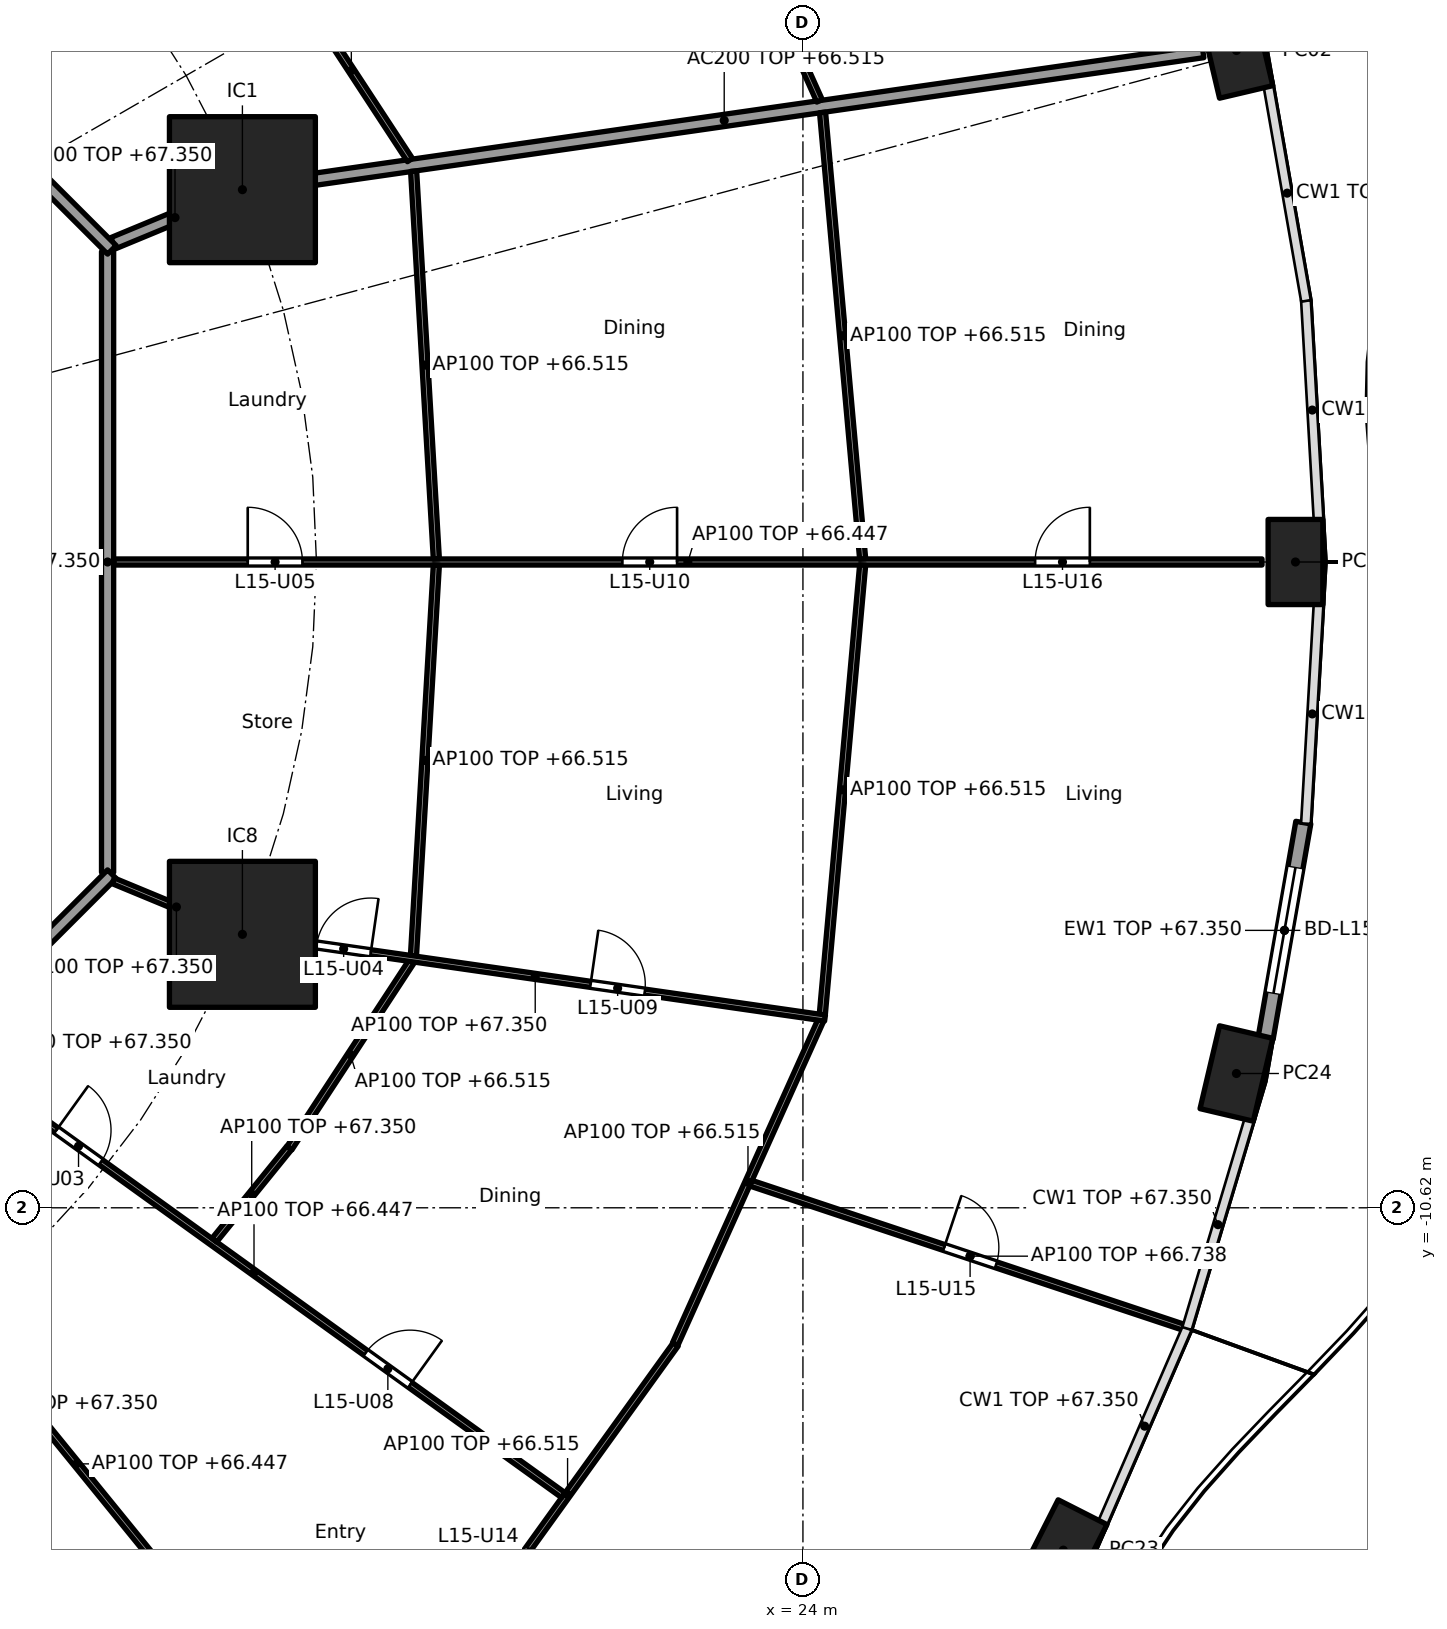
"""IFC4 building model, lengths in metres.
Left out: names, types, materials, properties, quantities, classifications, styles, units other than length and angle.
Written with IfcOpenShell. Run it as: python <this file> out.ifc"""

import sys

from ifc_helpers import new_model, si_unit, direction, frame, frame_2d, origin, origin_2d, place, context, subcontext, project, spatial, rectangle, hollow_rectangle, extrude, element, fill, save


model = new_model("IFC4")
c1 = context("Model", 3, precision=1e-05, world=origin(), true_north=direction((0.0, 1.0)))
c2 = subcontext(c1, "Body", "Model", "MODEL_VIEW")
j1 = project(units=[si_unit("LENGTHUNIT", "METRE"), si_unit("PLANEANGLEUNIT", "RADIAN")], contexts=[c1])
p1 = place(None, origin())
s1 = spatial("IfcSite", under=j1, at=p1, CompositionType="ELEMENT")
p2 = place(p1, origin())
s2 = spatial("IfcBuilding", under=s1, at=p2, CompositionType="ELEMENT")
p3 = place(p2, frame((0.0, 0.0, 64.0)))
s3 = spatial("IfcBuildingStorey", under=s2, at=p3, CompositionType="ELEMENT", Elevation=64.0)
for number, where, z_axis, x_axis in (
    (1, (32.1, 0.0, 0.0), (0.0, 0.0, 1.0), (0.0, 1.0, 0.0)),
    (2, (31.129, 8.412, 0.0), (0.0, 0.0, 1.0), (-0.229, 0.973, 0.0)),
    (3, (28.282, -16.25, 0.0), (0.0, 0.0, 1.0), (0.452, 0.892, 0.0)),
    (4, (31.129, -8.412, 0.0), (0.0, 0.0, 1.0), (0.229, 0.973, 0.0)),
):
    element("IfcColumn", number, at=place(p3, frame(where, z_axis=z_axis, x_axis=x_axis)), inside=s3, PredefinedType="COLUMN", context=c2, shape_type="SweptSolid", body=[
        extrude(hollow_rectangle(XDim=1.4, YDim=0.9, WallThickness=0.05, at=origin_2d()), origin(), (0.0, 0.0, 1.0), 3.7),
    ])
for number, where, z_axis, x_axis in (
    (5, (14.782, 6.123, 0.0), (0.0, 0.0, 1.0), (1.0, 0.0, 0.0)),
    (6, (14.782, -6.123, 0.0), (0.0, 0.0, 1.0), (1.0, 0.0, 0.0)),
):
    element("IfcColumn", number, at=place(p3, frame(where, z_axis=z_axis, x_axis=x_axis)), inside=s3, PredefinedType="COLUMN", context=c2, shape_type="SweptSolid", body=[
        extrude(rectangle(XDim=2.4, YDim=2.4, at=origin_2d()), origin(), (0.0, 0.0, 1.0), 3.7),
    ])
p4 = place(p3, frame((32.229, -4.286, 0.0), z_axis=(0.0, 0.0, 1.0), x_axis=(-0.172217377323, -0.98505897029, 0.0)))
e7 = element("IfcWall", 7, at=p4, inside=s3, PredefinedType="SOLIDWALL", context=c2, shape_type="SweptSolid", body=[
    extrude(rectangle(XDim=3.598, YDim=0.25, at=frame_2d((1.799, 0.0))), origin(), (0.0, 0.0, 1.0), 3.35),
])
p5 = place(p4, frame((0.749, 0.0, 0.0)))
e8 = element("IfcOpeningElement", 8, at=p5, cuts=e7, PredefinedType="OPENING", context=c2, shape_type="SweptSolid", body=[
    extrude(rectangle(XDim=2.1, YDim=2.4, at=frame_2d((1.05, 1.2))), frame((0.0, 0.135, 0.0), z_axis=(0.0, -1.0, 0.0), x_axis=(1.0, 0.0, 0.0)), (0.0, 0.0, 1.0), 0.27),
])
p6 = place(p3, frame((12.657, 5.243, 0.0), z_axis=(0.0, 0.0, 1.0), x_axis=(0.923853160736, 0.382747093259, 0.0)))
e9 = element("IfcWall", 9, at=p6, inside=s3, PredefinedType="PARTITIONING", context=c2, shape_type="SweptSolid", body=[
    extrude(rectangle(XDim=2.2, YDim=0.2, at=frame_2d((1.1, 0.0))), origin(), (0.0, 0.0, 1.0), 3.35),
])
p7 = place(p3, frame((14.832, 6.13, 0.0), z_axis=(0.0, 0.0, 1.0), x_axis=(0.989836541293, 0.142209779978, 0.0)))
e10 = element("IfcWall", 10, at=p7, inside=s3, PredefinedType="PARTITIONING", context=c2, shape_type="SweptSolid", body=[
    extrude(rectangle(XDim=15.909, YDim=0.2, at=frame_2d((7.955, 0.0))), origin(), (0.0, 0.0, 1.0), 2.515),
])
p8 = place(p3, frame((12.565, -5.104, 0.0), z_axis=(0.0, 0.0, 1.0), x_axis=(0.0, 1.0, 0.0)))
e11 = element("IfcWall", 11, at=p8, inside=s3, PredefinedType="PARTITIONING", context=c2, shape_type="SweptSolid", body=[
    extrude(rectangle(XDim=10.209, YDim=0.2, at=frame_2d((5.104, 0.0))), origin(), (0.0, 0.0, 1.0), 3.35),
])
p9 = place(p3, frame((12.635, 5.134, 0.0), z_axis=(0.0, 0.0, 1.0), x_axis=(-0.707106781187, 0.707106781187, 0.0)))
e12 = element("IfcWall", 12, at=p9, inside=s3, PredefinedType="PARTITIONING", context=c2, shape_type="SweptSolid", body=[
    extrude(rectangle(XDim=10.609, YDim=0.2, at=frame_2d((5.305, 0.0))), origin(), (0.0, 0.0, 1.0), 3.35),
])
p10 = place(p3, frame((5.275, -12.494, 0.0), z_axis=(0.0, 0.0, 1.0), x_axis=(0.707106781187, 0.707106781187, 0.0)))
e13 = element("IfcWall", 13, at=p10, inside=s3, PredefinedType="PARTITIONING", context=c2, shape_type="SweptSolid", body=[
    extrude(rectangle(XDim=10.409, YDim=0.2, at=frame_2d((5.205, 0.0))), origin(), (0.0, 0.0, 1.0), 3.35),
])
p11 = place(p10, frame((4.604, 0.0, 0.0)))
e14 = element("IfcOpeningElement", 14, at=p11, cuts=e13, PredefinedType="OPENING", context=c2, shape_type="SweptSolid", body=[
    extrude(rectangle(XDim=1.0, YDim=2.1, at=frame_2d((0.5, 1.05))), frame((0.0, 0.11, 0.0), z_axis=(0.0, -1.0, 0.0), x_axis=(1.0, 0.0, 0.0)), (0.0, 0.0, 1.0), 0.22),
])
p12 = place(p3, frame((12.665, 0.0, 0.0), z_axis=(0.0, 0.0, 1.0), x_axis=(1.0, 0.0, 0.0)))
e15 = element("IfcWall", 15, at=p12, inside=s3, PredefinedType="PARTITIONING", context=c2, shape_type="SweptSolid", body=[
    extrude(rectangle(XDim=18.885, YDim=0.1, at=frame_2d((9.443, 0.0))), origin(), (0.0, 0.0, 1.0), 2.447),
])
p13 = place(p12, frame((2.205, 0.0, 0.0)))
e16 = element("IfcOpeningElement", 16, at=p13, cuts=e15, PredefinedType="OPENING", context=c2, shape_type="SweptSolid", body=[
    extrude(rectangle(XDim=0.9, YDim=2.1, at=frame_2d((0.45, 1.05))), frame((0.0, 0.06, 0.0), z_axis=(0.0, -1.0, 0.0), x_axis=(1.0, 0.0, 0.0)), (0.0, 0.0, 1.0), 0.12),
])
p14 = place(p12, frame((8.366, 0.0, 0.0)))
e17 = element("IfcOpeningElement", 17, at=p14, cuts=e15, PredefinedType="OPENING", context=c2, shape_type="SweptSolid", body=[
    extrude(rectangle(XDim=0.9, YDim=2.1, at=frame_2d((0.45, 1.05))), frame((0.0, 0.06, 0.0), z_axis=(0.0, -1.0, 0.0), x_axis=(1.0, 0.0, 0.0)), (0.0, 0.0, 1.0), 0.12),
])
p15 = place(p12, frame((15.154, 0.0, 0.0)))
e18 = element("IfcOpeningElement", 18, at=p15, cuts=e15, PredefinedType="OPENING", context=c2, shape_type="SweptSolid", body=[
    extrude(rectangle(XDim=0.9, YDim=2.1, at=frame_2d((0.45, 1.05))), frame((0.0, 0.06, 0.0), z_axis=(0.0, -1.0, 0.0), x_axis=(1.0, 0.0, 0.0)), (0.0, 0.0, 1.0), 0.12),
])
p16 = place(p3, frame((17.971, 0.05, 0.0), z_axis=(0.0, 0.0, 1.0), x_axis=(-0.058513659907, 0.998286607946, 0.0)))
e19 = element("IfcWall", 19, at=p16, inside=s3, PredefinedType="PARTITIONING", context=c2, shape_type="SweptSolid", body=[
    extrude(rectangle(XDim=6.388, YDim=0.1, at=frame_2d((3.194, 0.0))), origin(), (0.0, 0.0, 1.0), 2.515),
])
p17 = place(p3, frame((17.971, -0.05, 0.0), z_axis=(0.0, 0.0, 1.0), x_axis=(-0.058475267553, -0.998288857538, 0.0)))
e20 = element("IfcWall", 20, at=p17, inside=s3, PredefinedType="PARTITIONING", context=c2, shape_type="SweptSolid", body=[
    extrude(rectangle(XDim=6.438, YDim=0.1, at=frame_2d((3.219, 0.0))), origin(), (0.0, 0.0, 1.0), 2.515),
])
p18 = place(p3, frame((24.982, 0.05, 0.0), z_axis=(0.0, 0.0, 1.0), x_axis=(-0.08944290521, 0.995991951126, 0.0)))
e21 = element("IfcWall", 21, at=p18, inside=s3, PredefinedType="PARTITIONING", context=c2, shape_type="SweptSolid", body=[
    extrude(rectangle(XDim=7.373, YDim=0.1, at=frame_2d((3.686, 0.0))), origin(), (0.0, 0.0, 1.0), 2.515),
])
p19 = place(p3, frame((24.982, -0.05, 0.0), z_axis=(0.0, 0.0, 1.0), x_axis=(-0.089432471274, -0.995992888068, 0.0)))
e22 = element("IfcWall", 22, at=p19, inside=s3, PredefinedType="PARTITIONING", context=c2, shape_type="SweptSolid", body=[
    extrude(rectangle(XDim=7.423, YDim=0.1, at=frame_2d((3.711, 0.0))), origin(), (0.0, 0.0, 1.0), 2.515),
])
p20 = place(p3, frame((17.537, 6.61, 0.0), z_axis=(0.0, 0.0, 1.0), x_axis=(-0.547637987196, 0.836715384692, 0.0)))
e23 = element("IfcWall", 23, at=p20, inside=s3, PredefinedType="PARTITIONING", context=c2, shape_type="SweptSolid", body=[
    extrude(rectangle(XDim=3.52, YDim=0.1, at=frame_2d((1.76, 0.0))), origin(), (0.0, 0.0, 1.0), 2.515),
])
p21 = place(p3, frame((24.273, 7.584, 0.0), z_axis=(0.0, 0.0, 1.0), x_axis=(-0.410201529109, 0.911994904326, 0.0)))
e24 = element("IfcWall", 24, at=p21, inside=s3, PredefinedType="PARTITIONING", context=c2, shape_type="SweptSolid", body=[
    extrude(rectangle(XDim=5.787, YDim=0.1, at=frame_2d((2.894, 0.0))), origin(), (0.0, 0.0, 1.0), 2.515),
])
p22 = place(p21, frame((2.444, 0.0, 0.0)))
e25 = element("IfcOpeningElement", 25, at=p22, cuts=e24, PredefinedType="OPENING", context=c2, shape_type="SweptSolid", body=[
    extrude(rectangle(XDim=0.9, YDim=2.1, at=frame_2d((0.45, 1.05))), frame((0.0, 0.06, 0.0), z_axis=(0.0, -1.0, 0.0), x_axis=(1.0, 0.0, 0.0)), (0.0, 0.0, 1.0), 0.12),
])
p23 = place(p3, frame((10.003, -15.503, 0.0), z_axis=(0.0, 0.0, 1.0), x_axis=(0.526446106164, -0.850208502254, 0.0)))
e26 = element("IfcWall", 26, at=p23, inside=s3, PredefinedType="PARTITIONING", context=c2, shape_type="SweptSolid", body=[
    extrude(rectangle(XDim=14.33, YDim=0.1, at=frame_2d((7.165, 0.0))), origin(), (0.0, 0.0, 1.0), 2.515),
])
p24 = place(p23, frame((10.415, 0.0, 0.0)))
e27 = element("IfcOpeningElement", 27, at=p24, cuts=e26, PredefinedType="OPENING", context=c2, shape_type="SweptSolid", body=[
    extrude(rectangle(XDim=0.9, YDim=2.1, at=frame_2d((0.45, 1.05))), frame((0.0, 0.06, 0.0), z_axis=(0.0, -1.0, 0.0), x_axis=(1.0, 0.0, 0.0)), (0.0, 0.0, 1.0), 0.12),
])
p25 = place(p3, frame((8.028, -9.882, 0.0), z_axis=(0.0, 0.0, 1.0), x_axis=(0.631035554955, -0.77575390968, 0.0)))
e28 = element("IfcWall", 28, at=p25, inside=s3, PredefinedType="PARTITIONING", context=c2, shape_type="SweptSolid", body=[
    extrude(rectangle(XDim=12.759, YDim=0.1, at=frame_2d((6.379, 0.0))), origin(), (0.0, 0.0, 1.0), 2.447),
])
p26 = place(p25, frame((2.311, 0.0, 0.0)))
e29 = element("IfcOpeningElement", 29, at=p26, cuts=e28, PredefinedType="OPENING", context=c2, shape_type="SweptSolid", body=[
    extrude(rectangle(XDim=0.9, YDim=2.1, at=frame_2d((0.45, 1.05))), frame((0.0, 0.06, 0.0), z_axis=(0.0, -1.0, 0.0), x_axis=(1.0, 0.0, 0.0)), (0.0, 0.0, 1.0), 0.12),
])
p27 = place(p25, frame((8.69, 0.0, 0.0)))
e30 = element("IfcOpeningElement", 30, at=p27, cuts=e28, PredefinedType="OPENING", context=c2, shape_type="SweptSolid", body=[
    extrude(rectangle(XDim=0.9, YDim=2.1, at=frame_2d((0.45, 1.05))), frame((0.0, 0.06, 0.0), z_axis=(0.0, -1.0, 0.0), x_axis=(1.0, 0.0, 0.0)), (0.0, 0.0, 1.0), 0.12),
])
p28 = place(p3, frame((18.351, -17.803, 0.0), z_axis=(0.0, 0.0, 1.0), x_axis=(0.584558392935, 0.811351640936, 0.0)))
e31 = element("IfcWall", 31, at=p28, inside=s3, PredefinedType="PARTITIONING", context=c2, shape_type="SweptSolid", body=[
    extrude(rectangle(XDim=6.084, YDim=0.1, at=frame_2d((3.042, 0.0))), origin(), (0.0, 0.0, 1.0), 2.515),
])
p29 = place(p28, frame((1.046, 0.0, 0.0)))
e32 = element("IfcOpeningElement", 32, at=p29, cuts=e31, PredefinedType="OPENING", context=c2, shape_type="SweptSolid", body=[
    extrude(rectangle(XDim=0.9, YDim=2.1, at=frame_2d((0.45, 1.05))), frame((0.0, 0.06, 0.0), z_axis=(0.0, -1.0, 0.0), x_axis=(1.0, 0.0, 0.0)), (0.0, 0.0, 1.0), 0.12),
])
p30 = place(p3, frame((9.886, -8.023, 0.0), z_axis=(0.0, 0.0, 1.0), x_axis=(0.811615973871, -0.58419133078, 0.0)))
e33 = element("IfcWall", 33, at=p30, inside=s3, PredefinedType="PARTITIONING", context=c2, shape_type="SweptSolid", body=[
    extrude(rectangle(XDim=12.535, YDim=0.1, at=frame_2d((6.268, 0.0))), origin(), (0.0, 0.0, 1.0), 2.447),
])
p31 = place(p30, frame((2.262, 0.0, 0.0)))
e34 = element("IfcOpeningElement", 34, at=p31, cuts=e33, PredefinedType="OPENING", context=c2, shape_type="SweptSolid", body=[
    extrude(rectangle(XDim=0.9, YDim=2.1, at=frame_2d((0.45, 1.05))), frame((0.0, 0.06, 0.0), z_axis=(0.0, -1.0, 0.0), x_axis=(1.0, 0.0, 0.0)), (0.0, 0.0, 1.0), 0.12),
])
p32 = place(p30, frame((8.53, 0.0, 0.0)))
e35 = element("IfcOpeningElement", 35, at=p32, cuts=e33, PredefinedType="OPENING", context=c2, shape_type="SweptSolid", body=[
    extrude(rectangle(XDim=0.9, YDim=2.1, at=frame_2d((0.45, 1.05))), frame((0.0, 0.06, 0.0), z_axis=(0.0, -1.0, 0.0), x_axis=(1.0, 0.0, 0.0)), (0.0, 0.0, 1.0), 0.12),
])
p33 = place(p3, frame((14.32, -11.153, 0.0), z_axis=(0.0, 0.0, 1.0), x_axis=(0.63006076661, 0.776545832761, 0.0)))
e36 = element("IfcWall", 36, at=p33, inside=s3, PredefinedType="PARTITIONING", context=c2, shape_type="SweptSolid", body=[
    extrude(rectangle(XDim=1.953, YDim=0.1, at=frame_2d((0.977, 0.0))), origin(), (0.0, 0.0, 1.0), 3.35),
])
p34 = place(p3, frame((15.555, -9.639, 0.0), z_axis=(0.0, 0.0, 1.0), x_axis=(0.547618530423, 0.836728119007, 0.0)))
e37 = element("IfcWall", 37, at=p34, inside=s3, PredefinedType="PARTITIONING", context=c2, shape_type="SweptSolid", body=[
    extrude(rectangle(XDim=3.67, YDim=0.1, at=frame_2d((1.835, 0.0))), origin(), (0.0, 0.0, 1.0), 2.515),
])
p35 = place(p3, frame((21.899, -12.861, 0.0), z_axis=(0.0, 0.0, 1.0), x_axis=(0.410197710154, 0.911996622025, 0.0)))
e38 = element("IfcWall", 38, at=p35, inside=s3, PredefinedType="PARTITIONING", context=c2, shape_type="SweptSolid", body=[
    extrude(rectangle(XDim=5.837, YDim=0.1, at=frame_2d((2.918, 0.0))), origin(), (0.0, 0.0, 1.0), 2.515),
])
p36 = place(p3, frame((23.144, -10.216, 0.0), z_axis=(0.0, 0.0, 1.0), x_axis=(0.948811715359, -0.315842253027, 0.0)))
e39 = element("IfcWall", 39, at=p36, inside=s3, PredefinedType="PARTITIONING", context=c2, shape_type="SweptSolid", body=[
    extrude(rectangle(XDim=7.6, YDim=0.1, at=frame_2d((3.8, 0.0))), origin(), (0.0, 0.0, 1.0), 2.738),
])
p37 = place(p36, frame((3.35, 0.0, 0.0)))
e40 = element("IfcOpeningElement", 40, at=p37, cuts=e39, PredefinedType="OPENING", context=c2, shape_type="SweptSolid", body=[
    extrude(rectangle(XDim=0.9, YDim=2.1, at=frame_2d((0.45, 1.05))), frame((0.0, 0.06, 0.0), z_axis=(0.0, -1.0, 0.0), x_axis=(1.0, 0.0, 0.0)), (0.0, 0.0, 1.0), 0.12),
])
p38 = place(p3, frame((12.657, -5.243, 0.0), z_axis=(0.0, 0.0, 1.0), x_axis=(0.923864733477, -0.382719158442, 0.0)))
e41 = element("IfcWall", 41, at=p38, inside=s3, PredefinedType="PARTITIONING", context=c2, shape_type="SweptSolid", body=[
    extrude(rectangle(XDim=2.25, YDim=0.1, at=frame_2d((1.125, 0.0))), origin(), (0.0, 0.0, 1.0), 3.35),
])
p39 = place(p3, frame((14.832, -6.13, 0.0), z_axis=(0.0, 0.0, 1.0), x_axis=(0.989837122016, -0.142205737856, 0.0)))
e42 = element("IfcWall", 42, at=p39, inside=s3, PredefinedType="PARTITIONING", context=c2, shape_type="SweptSolid", body=[
    extrude(rectangle(XDim=9.63, YDim=0.1, at=frame_2d((4.815, 0.0))), origin(), (0.0, 0.0, 1.0), 3.35),
])
p40 = place(p39, frame((1.182, 0.0, 0.0)))
e43 = element("IfcOpeningElement", 43, at=p40, cuts=e42, PredefinedType="OPENING", context=c2, shape_type="SweptSolid", body=[
    extrude(rectangle(XDim=0.9, YDim=2.1, at=frame_2d((0.45, 1.05))), frame((0.0, 0.06, 0.0), z_axis=(0.0, -1.0, 0.0), x_axis=(1.0, 0.0, 0.0)), (0.0, 0.0, 1.0), 0.12),
])
p41 = place(p39, frame((5.734, 0.0, 0.0)))
e44 = element("IfcOpeningElement", 44, at=p41, cuts=e42, PredefinedType="OPENING", context=c2, shape_type="SweptSolid", body=[
    extrude(rectangle(XDim=0.9, YDim=2.1, at=frame_2d((0.45, 1.05))), frame((0.0, 0.06, 0.0), z_axis=(0.0, -1.0, 0.0), x_axis=(1.0, 0.0, 0.0)), (0.0, 0.0, 1.0), 0.12),
])
p42 = place(p5, origin())
e45 = element("IfcDoor", 45, at=p42, inside=s3, OperationType="SLIDING_TO_LEFT", PredefinedType="DOOR", context=c2, shape_type="SweptSolid", body=[
    extrude(rectangle(XDim=2.1, YDim=2.4, at=frame_2d((1.05, 1.2))), frame((0.0, 0.025, 0.0), z_axis=(0.0, -1.0, 0.0), x_axis=(1.0, 0.0, 0.0)), (0.0, 0.0, 1.0), 0.05),
])
fill(e8, e45)
p43 = place(p31, origin())
e46 = element("IfcDoor", 46, at=p43, inside=s3, OperationType="SINGLE_SWING_LEFT", PredefinedType="DOOR", context=c2, shape_type="SweptSolid", body=[
    extrude(rectangle(XDim=0.9, YDim=2.1, at=frame_2d((0.45, 1.05))), frame((0.0, 0.025, 0.0), z_axis=(0.0, -1.0, 0.0), x_axis=(1.0, 0.0, 0.0)), (0.0, 0.0, 1.0), 0.05),
])
fill(e34, e46)
p44 = place(p40, origin())
e47 = element("IfcDoor", 47, at=p44, inside=s3, OperationType="SINGLE_SWING_RIGHT", PredefinedType="DOOR", context=c2, shape_type="SweptSolid", body=[
    extrude(rectangle(XDim=0.9, YDim=2.1, at=frame_2d((0.45, 1.05))), frame((0.0, 0.025, 0.0), z_axis=(0.0, -1.0, 0.0), x_axis=(1.0, 0.0, 0.0)), (0.0, 0.0, 1.0), 0.05),
])
fill(e43, e47)
p45 = place(p13, origin())
e48 = element("IfcDoor", 48, at=p45, inside=s3, OperationType="SINGLE_SWING_LEFT", PredefinedType="DOOR", context=c2, shape_type="SweptSolid", body=[
    extrude(rectangle(XDim=0.9, YDim=2.1, at=frame_2d((0.45, 1.05))), frame((0.0, 0.025, 0.0), z_axis=(0.0, -1.0, 0.0), x_axis=(1.0, 0.0, 0.0)), (0.0, 0.0, 1.0), 0.05),
])
fill(e16, e48)
p46 = place(p32, origin())
e49 = element("IfcDoor", 49, at=p46, inside=s3, OperationType="SINGLE_SWING_RIGHT", PredefinedType="DOOR", context=c2, shape_type="SweptSolid", body=[
    extrude(rectangle(XDim=0.9, YDim=2.1, at=frame_2d((0.45, 1.05))), frame((0.0, 0.025, 0.0), z_axis=(0.0, -1.0, 0.0), x_axis=(1.0, 0.0, 0.0)), (0.0, 0.0, 1.0), 0.05),
])
fill(e35, e49)
p47 = place(p41, origin())
e50 = element("IfcDoor", 50, at=p47, inside=s3, OperationType="SINGLE_SWING_LEFT", PredefinedType="DOOR", context=c2, shape_type="SweptSolid", body=[
    extrude(rectangle(XDim=0.9, YDim=2.1, at=frame_2d((0.45, 1.05))), frame((0.0, 0.025, 0.0), z_axis=(0.0, -1.0, 0.0), x_axis=(1.0, 0.0, 0.0)), (0.0, 0.0, 1.0), 0.05),
])
fill(e44, e50)
p48 = place(p14, origin())
e51 = element("IfcDoor", 51, at=p48, inside=s3, OperationType="SINGLE_SWING_RIGHT", PredefinedType="DOOR", context=c2, shape_type="SweptSolid", body=[
    extrude(rectangle(XDim=0.9, YDim=2.1, at=frame_2d((0.45, 1.05))), frame((0.0, 0.025, 0.0), z_axis=(0.0, -1.0, 0.0), x_axis=(1.0, 0.0, 0.0)), (0.0, 0.0, 1.0), 0.05),
])
fill(e17, e51)
p49 = place(p29, frame((0.9, 0.0, 0.0), x_axis=(-1.0, 0.0, 0.0)))
e52 = element("IfcDoor", 52, at=p49, inside=s3, OperationType="SINGLE_SWING_LEFT", PredefinedType="DOOR", context=c2, shape_type="SweptSolid", body=[
    extrude(rectangle(XDim=0.9, YDim=2.1, at=frame_2d((0.45, 1.05))), frame((0.0, 0.025, 0.0), z_axis=(0.0, -1.0, 0.0), x_axis=(1.0, 0.0, 0.0)), (0.0, 0.0, 1.0), 0.05),
])
fill(e32, e52)
p50 = place(p37, origin())
e53 = element("IfcDoor", 53, at=p50, inside=s3, OperationType="SINGLE_SWING_LEFT", PredefinedType="DOOR", context=c2, shape_type="SweptSolid", body=[
    extrude(rectangle(XDim=0.9, YDim=2.1, at=frame_2d((0.45, 1.05))), frame((0.0, 0.025, 0.0), z_axis=(0.0, -1.0, 0.0), x_axis=(1.0, 0.0, 0.0)), (0.0, 0.0, 1.0), 0.05),
])
fill(e40, e53)
p51 = place(p15, origin())
e54 = element("IfcDoor", 54, at=p51, inside=s3, OperationType="SINGLE_SWING_RIGHT", PredefinedType="DOOR", context=c2, shape_type="SweptSolid", body=[
    extrude(rectangle(XDim=0.9, YDim=2.1, at=frame_2d((0.45, 1.05))), frame((0.0, 0.025, 0.0), z_axis=(0.0, -1.0, 0.0), x_axis=(1.0, 0.0, 0.0)), (0.0, 0.0, 1.0), 0.05),
])
fill(e18, e54)
save(model, sys.argv[1])
